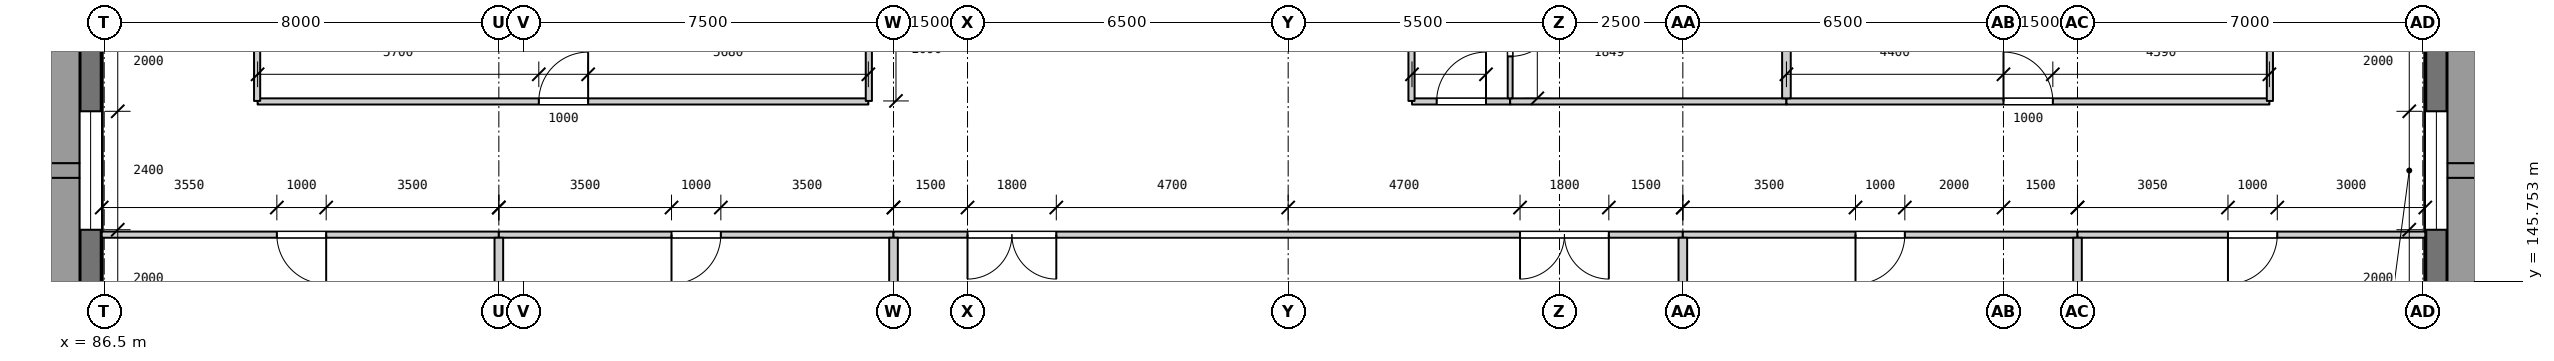
"""IFC4 building model, lengths in metres.
Left out: names, types, materials, properties, quantities, classifications, styles, units other than length and angle.
Written with IfcOpenShell. Run it as: python <this file> out.ifc"""

import sys

from ifc_helpers import new_model, si_unit, direction, frame, frame_2d, origin, place, context, subcontext, project, spatial, rectangle, extrude, element, fill, save


model = new_model("IFC4")
c1 = context("Model", 3, precision=1e-05, world=origin(), true_north=direction((0.0, 1.0)))
c2 = subcontext(c1, "Body", "Model", "MODEL_VIEW")
j1 = project(units=[si_unit("LENGTHUNIT", "METRE"), si_unit("PLANEANGLEUNIT", "RADIAN")], contexts=[c1])
p1 = place(None, origin())
s1 = spatial("IfcSite", under=j1, at=p1, CompositionType="ELEMENT")
p2 = place(p1, origin())
s2 = spatial("IfcBuilding", under=s1, at=p2, CompositionType="ELEMENT")
p3 = place(p2, frame((0.0, 0.0, 10.2)))
s3 = spatial("IfcBuildingStorey", under=s2, at=p3, CompositionType="ELEMENT", Elevation=10.2)
p4 = place(p3, frame((86.225, 144.8, 0.0), z_axis=(0.0, 0.0, 1.0), x_axis=(0.0, 1.0, 0.0)))
e1 = element("IfcWall", 1, at=p4, inside=s3, PredefinedType="SOLIDWALL", context=c2, shape_type="SweptSolid", body=[
    extrude(rectangle(XDim=6.4, YDim=0.45, at=frame_2d((3.2, 0.0))), origin(), (0.0, 0.0, 1.0), 3.2),
])
p5 = place(p4, frame((2.0, 0.0, 0.9)))
e2 = element("IfcOpeningElement", 2, at=p5, cuts=e1, PredefinedType="OPENING", context=c2, shape_type="SweptSolid", body=[
    extrude(rectangle(XDim=2.4, YDim=1.6, at=frame_2d((1.2, 0.8))), frame((0.0, 0.235, 0.0), z_axis=(0.0, -1.0, 0.0), x_axis=(1.0, 0.0, 0.0)), (0.0, 0.0, 1.0), 0.47),
])
p6 = place(p3, frame((133.775, 151.2, 0.0), z_axis=(0.0, 0.0, 1.0), x_axis=(0.0, -1.0, 0.0)))
e3 = element("IfcWall", 3, at=p6, inside=s3, PredefinedType="SOLIDWALL", context=c2, shape_type="SweptSolid", body=[
    extrude(rectangle(XDim=6.4, YDim=0.45, at=frame_2d((3.2, 0.0))), origin(), (0.0, 0.0, 1.0), 3.2),
])
p7 = place(p6, frame((2.0, 0.0, 0.9)))
e4 = element("IfcOpeningElement", 4, at=p7, cuts=e3, PredefinedType="OPENING", context=c2, shape_type="SweptSolid", body=[
    extrude(rectangle(XDim=2.4, YDim=1.6, at=frame_2d((1.2, 0.8))), frame((0.0, 0.235, 0.0), z_axis=(0.0, -1.0, 0.0), x_axis=(1.0, 0.0, 0.0)), (0.0, 0.0, 1.0), 0.47),
])
p8 = place(p3, frame((86.45, 146.7, 0.0), z_axis=(0.0, 0.0, 1.0), x_axis=(1.0, 0.0, 0.0)))
e5 = element("IfcWall", 5, at=p8, inside=s3, PredefinedType="PARTITIONING", context=c2, shape_type="SweptSolid", body=[
    extrude(rectangle(XDim=8.05, YDim=0.125, at=frame_2d((4.025, 0.0))), origin(), (0.0, 0.0, 1.0), 3.9),
])
p9 = place(p8, frame((3.55, 0.0, 0.0)))
e6 = element("IfcOpeningElement", 6, at=p9, cuts=e5, PredefinedType="OPENING", context=c2, shape_type="SweptSolid", body=[
    extrude(rectangle(XDim=1.0, YDim=2.1, at=frame_2d((0.5, 1.05))), frame((0.0, 0.073, 0.0), z_axis=(0.0, -1.0, 0.0), x_axis=(1.0, 0.0, 0.0)), (0.0, 0.0, 1.0), 0.145),
])
p10 = place(p3, frame((94.5, 146.7, 0.0), z_axis=(0.0, 0.0, 1.0), x_axis=(1.0, 0.0, 0.0)))
e7 = element("IfcWall", 7, at=p10, inside=s3, PredefinedType="PARTITIONING", context=c2, shape_type="SweptSolid", body=[
    extrude(rectangle(XDim=8.0, YDim=0.125, at=frame_2d((4.0, 0.0))), origin(), (0.0, 0.0, 1.0), 3.9),
])
p11 = place(p10, frame((3.5, 0.0, 0.0)))
e8 = element("IfcOpeningElement", 8, at=p11, cuts=e7, PredefinedType="OPENING", context=c2, shape_type="SweptSolid", body=[
    extrude(rectangle(XDim=1.0, YDim=2.1, at=frame_2d((0.5, 1.05))), frame((0.0, 0.073, 0.0), z_axis=(0.0, -1.0, 0.0), x_axis=(1.0, 0.0, 0.0)), (0.0, 0.0, 1.0), 0.145),
])
p12 = place(p3, frame((102.5, 146.7, 0.0), z_axis=(0.0, 0.0, 1.0), x_axis=(1.0, 0.0, 0.0)))
e9 = element("IfcWall", 9, at=p12, inside=s3, PredefinedType="PARTITIONING", context=c2, shape_type="SweptSolid", body=[
    extrude(rectangle(XDim=16.0, YDim=0.125, at=frame_2d((8.0, 0.0))), origin(), (0.0, 0.0, 1.0), 3.9),
])
p13 = place(p12, frame((1.5, 0.0, 0.0)))
e10 = element("IfcOpeningElement", 10, at=p13, cuts=e9, PredefinedType="OPENING", context=c2, shape_type="SweptSolid", body=[
    extrude(rectangle(XDim=1.8, YDim=2.1, at=frame_2d((0.9, 1.05))), frame((0.0, 0.073, 0.0), z_axis=(0.0, -1.0, 0.0), x_axis=(1.0, 0.0, 0.0)), (0.0, 0.0, 1.0), 0.145),
])
p14 = place(p12, frame((12.7, 0.0, 0.0)))
e11 = element("IfcOpeningElement", 11, at=p14, cuts=e9, PredefinedType="OPENING", context=c2, shape_type="SweptSolid", body=[
    extrude(rectangle(XDim=1.8, YDim=2.1, at=frame_2d((0.9, 1.05))), frame((0.0, 0.073, 0.0), z_axis=(0.0, -1.0, 0.0), x_axis=(1.0, 0.0, 0.0)), (0.0, 0.0, 1.0), 0.145),
])
p15 = place(p3, frame((118.5, 146.7, 0.0), z_axis=(0.0, 0.0, 1.0), x_axis=(1.0, 0.0, 0.0)))
e12 = element("IfcWall", 12, at=p15, inside=s3, PredefinedType="PARTITIONING", context=c2, shape_type="SweptSolid", body=[
    extrude(rectangle(XDim=8.0, YDim=0.125, at=frame_2d((4.0, 0.0))), origin(), (0.0, 0.0, 1.0), 3.9),
])
p16 = place(p15, frame((3.5, 0.0, 0.0)))
e13 = element("IfcOpeningElement", 13, at=p16, cuts=e12, PredefinedType="OPENING", context=c2, shape_type="SweptSolid", body=[
    extrude(rectangle(XDim=1.0, YDim=2.1, at=frame_2d((0.5, 1.05))), frame((0.0, 0.073, 0.0), z_axis=(0.0, -1.0, 0.0), x_axis=(1.0, 0.0, 0.0)), (0.0, 0.0, 1.0), 0.145),
])
p17 = place(p3, frame((126.5, 146.7, 0.0), z_axis=(0.0, 0.0, 1.0), x_axis=(1.0, 0.0, 0.0)))
e14 = element("IfcWall", 14, at=p17, inside=s3, PredefinedType="PARTITIONING", context=c2, shape_type="SweptSolid", body=[
    extrude(rectangle(XDim=7.05, YDim=0.125, at=frame_2d((3.525, 0.0))), origin(), (0.0, 0.0, 1.0), 3.9),
])
p18 = place(p17, frame((3.05, 0.0, 0.0)))
e15 = element("IfcOpeningElement", 15, at=p18, cuts=e14, PredefinedType="OPENING", context=c2, shape_type="SweptSolid", body=[
    extrude(rectangle(XDim=1.0, YDim=2.1, at=frame_2d((0.5, 1.05))), frame((0.0, 0.073, 0.0), z_axis=(0.0, -1.0, 0.0), x_axis=(1.0, 0.0, 0.0)), (0.0, 0.0, 1.0), 0.145),
])
p19 = place(p3, frame((89.61, 149.4, 0.0), z_axis=(0.0, 0.0, 1.0), x_axis=(1.0, 0.0, 0.0)))
e16 = element("IfcWall", 16, at=p19, inside=s3, PredefinedType="PARTITIONING", context=c2, shape_type="SweptSolid", body=[
    extrude(rectangle(XDim=12.38, YDim=0.125, at=frame_2d((6.19, 0.0))), origin(), (0.0, 0.0, 1.0), 3.9),
])
p20 = place(p19, frame((5.7, 0.0, 0.0)))
e17 = element("IfcOpeningElement", 17, at=p20, cuts=e16, PredefinedType="OPENING", context=c2, shape_type="SweptSolid", body=[
    extrude(rectangle(XDim=1.0, YDim=2.1, at=frame_2d((0.5, 1.05))), frame((0.0, 0.073, 0.0), z_axis=(0.0, -1.0, 0.0), x_axis=(1.0, 0.0, 0.0)), (0.0, 0.0, 1.0), 0.145),
])
p21 = place(p3, frame((113.01, 149.4, 0.0), z_axis=(0.0, 0.0, 1.0), x_axis=(1.0, 0.0, 0.0)))
e18 = element("IfcWall", 18, at=p21, inside=s3, PredefinedType="PARTITIONING", context=c2, shape_type="SweptSolid", body=[
    extrude(rectangle(XDim=1.99, YDim=0.125, at=frame_2d((0.995, 0.0))), origin(), (0.0, 0.0, 1.0), 3.9),
])
p22 = place(p21, frame((0.5, 0.0, 0.0)))
e19 = element("IfcOpeningElement", 19, at=p22, cuts=e18, PredefinedType="OPENING", context=c2, shape_type="SweptSolid", body=[
    extrude(rectangle(XDim=1.0, YDim=2.1, at=frame_2d((0.5, 1.05))), frame((0.0, 0.073, 0.0), z_axis=(0.0, -1.0, 0.0), x_axis=(1.0, 0.0, 0.0)), (0.0, 0.0, 1.0), 0.145),
])
p23 = place(p3, frame((115.0, 149.4, 0.0), z_axis=(0.0, 0.0, 1.0), x_axis=(1.0, 0.0, 0.0)))
e20 = element("IfcWall", 20, at=p23, inside=s3, PredefinedType="PARTITIONING", context=c2, shape_type="SweptSolid", body=[
    extrude(rectangle(XDim=5.6, YDim=0.125, at=frame_2d((2.8, 0.0))), origin(), (0.0, 0.0, 1.0), 3.9),
])
p24 = place(p3, frame((120.6, 149.4, 0.0), z_axis=(0.0, 0.0, 1.0), x_axis=(1.0, 0.0, 0.0)))
e21 = element("IfcWall", 21, at=p24, inside=s3, PredefinedType="PARTITIONING", context=c2, shape_type="SweptSolid", body=[
    extrude(rectangle(XDim=9.79, YDim=0.125, at=frame_2d((4.895, 0.0))), origin(), (0.0, 0.0, 1.0), 3.9),
])
p25 = place(p24, frame((4.4, 0.0, 0.0)))
e22 = element("IfcOpeningElement", 22, at=p25, cuts=e21, PredefinedType="OPENING", context=c2, shape_type="SweptSolid", body=[
    extrude(rectangle(XDim=1.0, YDim=2.1, at=frame_2d((0.5, 1.05))), frame((0.0, 0.073, 0.0), z_axis=(0.0, -1.0, 0.0), x_axis=(1.0, 0.0, 0.0)), (0.0, 0.0, 1.0), 0.145),
])
p26 = place(p3, frame((89.6, 149.41, 0.0), z_axis=(0.0, 0.0, 1.0), x_axis=(0.0, 1.0, 0.0)))
e23 = element("IfcWall", 23, at=p26, inside=s3, PredefinedType="PARTITIONING", context=c2, shape_type="SweptSolid", body=[
    extrude(rectangle(XDim=8.29, YDim=0.125, at=frame_2d((4.145, 0.0))), origin(), (0.0, 0.0, 1.0), 3.9),
])
p27 = place(p3, frame((94.5, 144.8, 0.0), z_axis=(0.0, 0.0, 1.0), x_axis=(0.0, 1.0, 0.0)))
e24 = element("IfcWall", 24, at=p27, inside=s3, PredefinedType="PARTITIONING", context=c2, shape_type="SweptSolid", body=[
    extrude(rectangle(XDim=1.837, YDim=0.175, at=frame_2d((0.919, 0.0))), origin(), (0.0, 0.0, 1.0), 3.2),
])
p28 = place(p3, frame((102.0, 149.41, 0.0), z_axis=(0.0, 0.0, 1.0), x_axis=(0.0, 1.0, 0.0)))
e25 = element("IfcWall", 25, at=p28, inside=s3, PredefinedType="PARTITIONING", context=c2, shape_type="SweptSolid", body=[
    extrude(rectangle(XDim=8.29, YDim=0.125, at=frame_2d((4.145, 0.0))), origin(), (0.0, 0.0, 1.0), 3.9),
])
p29 = place(p28, frame((3.65, 0.0, 0.0)))
e26 = element("IfcOpeningElement", 26, at=p29, cuts=e25, PredefinedType="OPENING", context=c2, shape_type="SweptSolid", body=[
    extrude(rectangle(XDim=1.0, YDim=2.1, at=frame_2d((0.5, 1.05))), frame((0.0, 0.073, 0.0), z_axis=(0.0, -1.0, 0.0), x_axis=(1.0, 0.0, 0.0)), (0.0, 0.0, 1.0), 0.145),
])
p30 = place(p3, frame((102.5, 144.8, 0.0), z_axis=(0.0, 0.0, 1.0), x_axis=(0.0, 1.0, 0.0)))
e27 = element("IfcWall", 27, at=p30, inside=s3, PredefinedType="PARTITIONING", context=c2, shape_type="SweptSolid", body=[
    extrude(rectangle(XDim=1.837, YDim=0.175, at=frame_2d((0.919, 0.0))), origin(), (0.0, 0.0, 1.0), 3.2),
])
p31 = place(p3, frame((113.0, 149.41, 0.0), z_axis=(0.0, 0.0, 1.0), x_axis=(0.0, 1.0, 0.0)))
e28 = element("IfcWall", 28, at=p31, inside=s3, PredefinedType="PARTITIONING", context=c2, shape_type="SweptSolid", body=[
    extrude(rectangle(XDim=8.29, YDim=0.125, at=frame_2d((4.145, 0.0))), origin(), (0.0, 0.0, 1.0), 3.9),
])
p32 = place(p3, frame((115.0, 149.462, 0.0), z_axis=(0.0, 0.0, 1.0), x_axis=(0.0, 1.0, 0.0)))
e29 = element("IfcWall", 29, at=p32, inside=s3, PredefinedType="PARTITIONING", context=c2, shape_type="SweptSolid", body=[
    extrude(rectangle(XDim=2.704, YDim=0.1, at=frame_2d((1.352, 0.0))), origin(), (0.0, 0.0, 1.0), 3.9),
])
p33 = place(p32, frame((0.85, 0.0, 0.0)))
e30 = element("IfcOpeningElement", 30, at=p33, cuts=e29, PredefinedType="OPENING", context=c2, shape_type="SweptSolid", body=[
    extrude(rectangle(XDim=1.0, YDim=2.1, at=frame_2d((0.5, 1.05))), frame((0.0, 0.06, 0.0), z_axis=(0.0, -1.0, 0.0), x_axis=(1.0, 0.0, 0.0)), (0.0, 0.0, 1.0), 0.12),
])
p34 = place(p3, frame((118.5, 144.8, 0.0), z_axis=(0.0, 0.0, 1.0), x_axis=(0.0, 1.0, 0.0)))
e31 = element("IfcWall", 31, at=p34, inside=s3, PredefinedType="PARTITIONING", context=c2, shape_type="SweptSolid", body=[
    extrude(rectangle(XDim=1.837, YDim=0.175, at=frame_2d((0.919, 0.0))), origin(), (0.0, 0.0, 1.0), 3.2),
])
p35 = place(p3, frame((120.6, 149.462, 0.0), z_axis=(0.0, 0.0, 1.0), x_axis=(0.0, 1.0, 0.0)))
e32 = element("IfcWall", 32, at=p35, inside=s3, PredefinedType="PARTITIONING", context=c2, shape_type="SweptSolid", body=[
    extrude(rectangle(XDim=2.704, YDim=0.175, at=frame_2d((1.352, 0.0))), origin(), (0.0, 0.0, 1.0), 3.9),
])
p36 = place(p3, frame((126.5, 144.8, 0.0), z_axis=(0.0, 0.0, 1.0), x_axis=(0.0, 1.0, 0.0)))
e33 = element("IfcWall", 33, at=p36, inside=s3, PredefinedType="PARTITIONING", context=c2, shape_type="SweptSolid", body=[
    extrude(rectangle(XDim=1.837, YDim=0.175, at=frame_2d((0.919, 0.0))), origin(), (0.0, 0.0, 1.0), 3.2),
])
p37 = place(p3, frame((130.4, 149.41, 0.0), z_axis=(0.0, 0.0, 1.0), x_axis=(0.0, 1.0, 0.0)))
e34 = element("IfcWall", 34, at=p37, inside=s3, PredefinedType="PARTITIONING", context=c2, shape_type="SweptSolid", body=[
    extrude(rectangle(XDim=8.29, YDim=0.125, at=frame_2d((4.145, 0.0))), origin(), (0.0, 0.0, 1.0), 3.9),
])
p38 = place(p5, origin())
e35 = element("IfcWindow", 35, at=p38, inside=s3, PartitioningType="SINGLE_PANEL", PredefinedType="WINDOW", context=c2, shape_type="SweptSolid", body=[
    extrude(rectangle(XDim=2.4, YDim=1.6, at=frame_2d((1.2, 0.8))), frame((0.0, -0.125, 0.0), z_axis=(0.0, -1.0, 0.0), x_axis=(1.0, 0.0, 0.0)), (0.0, 0.0, 1.0), 0.06),
])
fill(e2, e35)
p39 = place(p7, origin())
e36 = element("IfcWindow", 36, at=p39, inside=s3, PartitioningType="SINGLE_PANEL", PredefinedType="WINDOW", context=c2, shape_type="SweptSolid", body=[
    extrude(rectangle(XDim=2.4, YDim=1.6, at=frame_2d((1.2, 0.8))), frame((0.0, -0.125, 0.0), z_axis=(0.0, -1.0, 0.0), x_axis=(1.0, 0.0, 0.0)), (0.0, 0.0, 1.0), 0.06),
])
fill(e4, e36)
p40 = place(p9, frame((1.0, 0.0, 0.0), z_axis=(0.0, 0.0, 1.0), x_axis=(-1.0, 0.0, 0.0)))
e37 = element("IfcDoor", 37, at=p40, inside=s3, OperationType="SINGLE_SWING_LEFT", PredefinedType="DOOR", context=c2, shape_type="SweptSolid", body=[
    extrude(rectangle(XDim=1.0, YDim=2.1, at=frame_2d((0.5, 1.05))), frame((0.0, 0.025, 0.0), z_axis=(0.0, -1.0, 0.0), x_axis=(1.0, 0.0, 0.0)), (0.0, 0.0, 1.0), 0.05),
])
fill(e6, e37)
p41 = place(p11, frame((1.0, 0.0, 0.0), z_axis=(0.0, 0.0, 1.0), x_axis=(-1.0, 0.0, 0.0)))
e38 = element("IfcDoor", 38, at=p41, inside=s3, OperationType="SINGLE_SWING_RIGHT", PredefinedType="DOOR", context=c2, shape_type="SweptSolid", body=[
    extrude(rectangle(XDim=1.0, YDim=2.1, at=frame_2d((0.5, 1.05))), frame((0.0, 0.025, 0.0), z_axis=(0.0, -1.0, 0.0), x_axis=(1.0, 0.0, 0.0)), (0.0, 0.0, 1.0), 0.05),
])
fill(e8, e38)
p42 = place(p13, frame((1.8, 0.0, 0.0), z_axis=(0.0, 0.0, 1.0), x_axis=(-1.0, 0.0, 0.0)))
e39 = element("IfcDoor", 39, at=p42, inside=s3, OperationType="DOUBLE_DOOR_SINGLE_SWING", PredefinedType="DOOR", context=c2, shape_type="SweptSolid", body=[
    extrude(rectangle(XDim=1.8, YDim=2.1, at=frame_2d((0.9, 1.05))), frame((0.0, 0.025, 0.0), z_axis=(0.0, -1.0, 0.0), x_axis=(1.0, 0.0, 0.0)), (0.0, 0.0, 1.0), 0.05),
])
fill(e10, e39)
p43 = place(p14, frame((1.8, 0.0, 0.0), z_axis=(0.0, 0.0, 1.0), x_axis=(-1.0, 0.0, 0.0)))
e40 = element("IfcDoor", 40, at=p43, inside=s3, OperationType="DOUBLE_DOOR_SINGLE_SWING", PredefinedType="DOOR", context=c2, shape_type="SweptSolid", body=[
    extrude(rectangle(XDim=1.8, YDim=2.1, at=frame_2d((0.9, 1.05))), frame((0.0, 0.025, 0.0), z_axis=(0.0, -1.0, 0.0), x_axis=(1.0, 0.0, 0.0)), (0.0, 0.0, 1.0), 0.05),
])
fill(e11, e40)
p44 = place(p16, frame((1.0, 0.0, 0.0), z_axis=(0.0, 0.0, 1.0), x_axis=(-1.0, 0.0, 0.0)))
e41 = element("IfcDoor", 41, at=p44, inside=s3, OperationType="SINGLE_SWING_RIGHT", PredefinedType="DOOR", context=c2, shape_type="SweptSolid", body=[
    extrude(rectangle(XDim=1.0, YDim=2.1, at=frame_2d((0.5, 1.05))), frame((0.0, 0.025, 0.0), z_axis=(0.0, -1.0, 0.0), x_axis=(1.0, 0.0, 0.0)), (0.0, 0.0, 1.0), 0.05),
])
fill(e13, e41)
p45 = place(p18, frame((1.0, 0.0, 0.0), z_axis=(0.0, 0.0, 1.0), x_axis=(-1.0, 0.0, 0.0)))
e42 = element("IfcDoor", 42, at=p45, inside=s3, OperationType="SINGLE_SWING_RIGHT", PredefinedType="DOOR", context=c2, shape_type="SweptSolid", body=[
    extrude(rectangle(XDim=1.0, YDim=2.1, at=frame_2d((0.5, 1.05))), frame((0.0, 0.025, 0.0), z_axis=(0.0, -1.0, 0.0), x_axis=(1.0, 0.0, 0.0)), (0.0, 0.0, 1.0), 0.05),
])
fill(e15, e42)
p46 = place(p20, origin())
e43 = element("IfcDoor", 43, at=p46, inside=s3, OperationType="SINGLE_SWING_RIGHT", PredefinedType="DOOR", context=c2, shape_type="SweptSolid", body=[
    extrude(rectangle(XDim=1.0, YDim=2.1, at=frame_2d((0.5, 1.05))), frame((0.0, 0.025, 0.0), z_axis=(0.0, -1.0, 0.0), x_axis=(1.0, 0.0, 0.0)), (0.0, 0.0, 1.0), 0.05),
])
fill(e17, e43)
p47 = place(p22, origin())
e44 = element("IfcDoor", 44, at=p47, inside=s3, OperationType="SINGLE_SWING_RIGHT", PredefinedType="DOOR", context=c2, shape_type="SweptSolid", body=[
    extrude(rectangle(XDim=1.0, YDim=2.1, at=frame_2d((0.5, 1.05))), frame((0.0, 0.025, 0.0), z_axis=(0.0, -1.0, 0.0), x_axis=(1.0, 0.0, 0.0)), (0.0, 0.0, 1.0), 0.05),
])
fill(e19, e44)
p48 = place(p25, origin())
e45 = element("IfcDoor", 45, at=p48, inside=s3, OperationType="SINGLE_SWING_LEFT", PredefinedType="DOOR", context=c2, shape_type="SweptSolid", body=[
    extrude(rectangle(XDim=1.0, YDim=2.1, at=frame_2d((0.5, 1.05))), frame((0.0, 0.025, 0.0), z_axis=(0.0, -1.0, 0.0), x_axis=(1.0, 0.0, 0.0)), (0.0, 0.0, 1.0), 0.05),
])
fill(e22, e45)
p49 = place(p33, frame((1.0, 0.0, 0.0), z_axis=(0.0, 0.0, 1.0), x_axis=(-1.0, 0.0, 0.0)))
e46 = element("IfcDoor", 46, at=p49, inside=s3, OperationType="SINGLE_SWING_LEFT", PredefinedType="DOOR", context=c2, shape_type="SweptSolid", body=[
    extrude(rectangle(XDim=1.0, YDim=2.1, at=frame_2d((0.5, 1.05))), frame((0.0, 0.025, 0.0), z_axis=(0.0, -1.0, 0.0), x_axis=(1.0, 0.0, 0.0)), (0.0, 0.0, 1.0), 0.05),
])
fill(e30, e46)
save(model, sys.argv[1])
